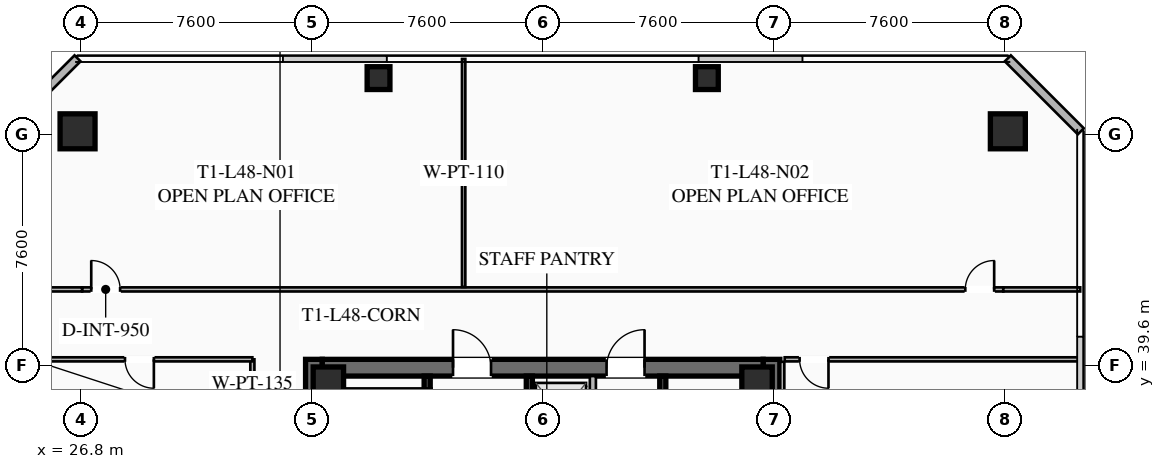
"""IFC4 building model, lengths in metres.
Left out: names, types, materials, properties, quantities, classifications, styles, units other than length and angle.
Written with IfcOpenShell. Run it as: python <this file> out.ifc"""

import sys

from ifc_helpers import new_model, si_unit, direction, frame, frame_2d, origin, origin_2d, place, context, subcontext, project, spatial, rectangle, hollow_rectangle, extrude, element, fill, save


model = new_model("IFC4")
c1 = context("Model", 3, precision=1e-05, world=origin(), true_north=direction((0.0, 1.0)))
c2 = subcontext(c1, "Body", "Model", "MODEL_VIEW")
j1 = project(units=[si_unit("LENGTHUNIT", "METRE"), si_unit("PLANEANGLEUNIT", "RADIAN")], contexts=[c1])
p1 = place(None, origin())
s1 = spatial("IfcSite", under=j1, at=p1, CompositionType="ELEMENT")
p2 = place(p1, origin())
s2 = spatial("IfcBuilding", under=s1, at=p2, CompositionType="ELEMENT")
p3 = place(p2, frame((0.0, 0.0, 178.3)))
s3 = spatial("IfcBuildingStorey", under=s2, at=p3, CompositionType="ELEMENT", Elevation=178.3)
for number, where, z_axis, x_axis in (
    (1, (34.475, 24.2, 0.0), (0.0, 0.0, 1.0), (0.0, 1.0, 0.0)),
    (2, (49.525, 39.8, 0.0), (0.0, 0.0, 1.0), (0.0, -1.0, 0.0)),
):
    element("IfcWall", number, at=place(p3, frame(where, z_axis=z_axis, x_axis=x_axis)), inside=s3, PredefinedType="SHEAR", context=c2, shape_type="SweptSolid", body=[
        extrude(rectangle(XDim=15.6, YDim=0.55, at=frame_2d((7.8, 0.0))), origin(), (0.0, 0.0, 1.0), 3.55),
    ])
p4 = place(p3, frame((34.75, 39.525, 0.0), z_axis=(0.0, 0.0, 1.0), x_axis=(1.0, 0.0, 0.0)))
e3 = element("IfcWall", 3, at=p4, inside=s3, PredefinedType="SHEAR", context=c2, shape_type="SweptSolid", body=[
    extrude(rectangle(XDim=14.5, YDim=0.55, at=frame_2d((7.25, 0.0))), origin(), (0.0, 0.0, 1.0), 3.55),
])
p5 = place(p4, frame((4.3, 0.0, 0.0)))
e4 = element("IfcOpeningElement", 4, at=p5, cuts=e3, PredefinedType="OPENING", context=c2, shape_type="SweptSolid", body=[
    extrude(rectangle(XDim=1.25, YDim=2.25, at=frame_2d((0.625, 1.125))), frame((0.0, 0.285, 0.0), z_axis=(0.0, -1.0, 0.0), x_axis=(1.0, 0.0, 0.0)), (0.0, 0.0, 1.0), 0.57),
])
p6 = place(p4, frame((9.35, 0.0, 0.0)))
e5 = element("IfcOpeningElement", 5, at=p6, cuts=e3, PredefinedType="OPENING", context=c2, shape_type="SweptSolid", body=[
    extrude(rectangle(XDim=1.25, YDim=2.25, at=frame_2d((0.625, 1.125))), frame((0.0, 0.285, 0.0), z_axis=(0.0, -1.0, 0.0), x_axis=(1.0, 0.0, 0.0)), (0.0, 0.0, 1.0), 0.57),
])
for number, where, z_axis, x_axis in (
    (6, (49.05, 39.05, 0.0), (0.0, 0.0, 1.0), (1.0, 0.0, 0.0)),
    (7, (34.95, 39.05, 0.0), (0.0, 0.0, 1.0), (1.0, 0.0, 0.0)),
):
    element("IfcColumn", number, at=place(p3, frame(where, z_axis=z_axis, x_axis=x_axis)), inside=s3, PredefinedType="COLUMN", context=c2, shape_type="SweptSolid", body=[
        extrude(hollow_rectangle(XDim=1.0, YDim=1.0, WallThickness=0.04, at=origin_2d()), origin(), (0.0, 0.0, 1.0), 3.37),
    ])
for number, where, z_axis, x_axis in (
    (8, (57.3, 47.3, 0.0), (0.0, 0.0, 1.0), (1.0, 0.0, 0.0)),
    (9, (26.7, 47.3, 0.0), (0.0, 0.0, 1.0), (1.0, 0.0, 0.0)),
):
    element("IfcColumn", number, at=place(p3, frame(where, z_axis=z_axis, x_axis=x_axis)), inside=s3, PredefinedType="COLUMN", context=c2, shape_type="SweptSolid", body=[
        extrude(hollow_rectangle(XDim=1.15, YDim=1.15, WallThickness=0.045, at=origin_2d()), origin(), (0.0, 0.0, 1.0), 3.37),
    ])
for number, where, z_axis, x_axis in (
    (10, (47.4, 49.05, 0.0), (0.0, 0.0, 1.0), (1.0, 0.0, 0.0)),
    (11, (36.6, 49.05, 0.0), (0.0, 0.0, 1.0), (1.0, 0.0, 0.0)),
):
    element("IfcColumn", number, at=place(p3, frame(where, z_axis=z_axis, x_axis=x_axis)), inside=s3, PredefinedType="COLUMN", context=c2, shape_type="SweptSolid", body=[
        extrude(hollow_rectangle(XDim=0.75, YDim=0.75, WallThickness=0.032, at=origin_2d()), origin(), (0.0, 0.0, 1.0), 3.37),
    ])
for number, where, z_axis, x_axis in (
    (12, (24.3, 47.3, 0.0), (0.0, 0.0, 1.0), (0.707, 0.707, 0.0)),
    (13, (57.3, 49.7, 0.0), (0.0, 0.0, 1.0), (0.707, -0.707, 0.0)),
):
    element("IfcWall", number, at=place(p3, frame(where, z_axis=z_axis, x_axis=x_axis)), inside=s3, PredefinedType="SOLIDWALL", context=c2, shape_type="SweptSolid", body=[
        extrude(rectangle(XDim=3.394, YDim=0.28, at=frame_2d((1.697, 0.0))), origin(), (0.0, 0.0, 1.0), 3.37),
    ])
p7 = place(p3, frame((38.2, 31.2, 0.0), z_axis=(0.0, 0.0, 1.0), x_axis=(0.0, 1.0, 0.0)))
e14 = element("IfcWall", 14, at=p7, inside=s3, PredefinedType="SHEAR", context=c2, shape_type="SweptSolid", body=[
    extrude(rectangle(XDim=8.05, YDim=0.2, at=frame_2d((4.025, 0.0))), origin(), (0.0, 0.0, 1.0), 3.37),
])
p8 = place(p7, frame((0.45, 0.0, 0.0)))
e15 = element("IfcOpeningElement", 15, at=p8, cuts=e14, PredefinedType="OPENING", context=c2, shape_type="SweptSolid", body=[
    extrude(rectangle(XDim=1.15, YDim=2.2, at=frame_2d((0.575, 1.1))), frame((0.0, 0.11, 0.0), z_axis=(0.0, -1.0, 0.0), x_axis=(1.0, 0.0, 0.0)), (0.0, 0.0, 1.0), 0.22),
])
p9 = place(p3, frame((41.56, 24.75, 0.0), z_axis=(0.0, 0.0, 1.0), x_axis=(0.0, 1.0, 0.0)))
e16 = element("IfcWall", 16, at=p9, inside=s3, PredefinedType="SHEAR", context=c2, shape_type="SweptSolid", body=[
    extrude(rectangle(XDim=14.5, YDim=0.2, at=frame_2d((7.25, 0.0))), origin(), (0.0, 0.0, 1.0), 3.37),
])
p10 = place(p3, frame((45.95, 39.25, 0.0), z_axis=(0.0, 0.0, 1.0), x_axis=(0.0, -1.0, 0.0)))
e17 = element("IfcWall", 17, at=p10, inside=s3, PredefinedType="SHEAR", context=c2, shape_type="SweptSolid", body=[
    extrude(rectangle(XDim=6.45, YDim=0.2, at=frame_2d((3.225, 0.0))), origin(), (0.0, 0.0, 1.0), 3.37),
])
p11 = place(p3, frame((43.65, 32.35, 0.0), z_axis=(0.0, 0.0, 1.0), x_axis=(0.0, 1.0, 0.0)))
e18 = element("IfcWall", 18, at=p11, inside=s3, PredefinedType="SOLIDWALL", context=c2, shape_type="SweptSolid", body=[
    extrude(rectangle(XDim=6.9, YDim=0.2, at=frame_2d((3.45, 0.0))), origin(), (0.0, 0.0, 1.0), 3.37),
])
p12 = place(p11, frame((0.575, 0.0, 0.0)))
e19 = element("IfcOpeningElement", 19, at=p12, cuts=e18, PredefinedType="OPENING", context=c2, shape_type="SweptSolid", body=[
    extrude(rectangle(XDim=1.1, YDim=2.2, at=frame_2d((0.55, 1.1))), frame((0.0, 0.11, 0.0), z_axis=(0.0, -1.0, 0.0), x_axis=(1.0, 0.0, 0.0)), (0.0, 0.0, 1.0), 0.22),
])
p13 = place(p11, frame((2.825, 0.0, 0.0)))
e20 = element("IfcOpeningElement", 20, at=p13, cuts=e18, PredefinedType="OPENING", context=c2, shape_type="SweptSolid", body=[
    extrude(rectangle(XDim=1.1, YDim=2.2, at=frame_2d((0.55, 1.1))), frame((0.0, 0.11, 0.0), z_axis=(0.0, -1.0, 0.0), x_axis=(1.0, 0.0, 0.0)), (0.0, 0.0, 1.0), 0.22),
])
p14 = place(p11, frame((5.075, 0.0, 0.0)))
e21 = element("IfcOpeningElement", 21, at=p14, cuts=e18, PredefinedType="OPENING", context=c2, shape_type="SweptSolid", body=[
    extrude(rectangle(XDim=1.1, YDim=2.2, at=frame_2d((0.55, 1.1))), frame((0.0, 0.11, 0.0), z_axis=(0.0, -1.0, 0.0), x_axis=(1.0, 0.0, 0.0)), (0.0, 0.0, 1.0), 0.22),
])
p15 = place(p3, frame((32.45, 35.4, 0.0), z_axis=(0.0, 0.0, 1.0), x_axis=(0.0, 1.0, 0.0)))
e22 = element("IfcWall", 22, at=p15, inside=s3, PredefinedType="PARTITIONING", context=c2, shape_type="SweptSolid", body=[
    extrude(rectangle(XDim=4.4, YDim=0.135, at=frame_2d((2.2, 0.0))), origin(), (0.0, 0.0, 1.0), 2.723),
])
p16 = place(p3, frame((26.85, 42.1, 0.0), z_axis=(0.0, 0.0, 1.0), x_axis=(1.0, 0.0, 0.0)))
e23 = element("IfcWall", 23, at=p16, inside=s3, PredefinedType="PARTITIONING", context=c2, shape_type="SweptSolid", body=[
    extrude(rectangle(XDim=30.3, YDim=0.135, at=frame_2d((15.15, 0.0))), origin(), (0.0, 0.0, 1.0), 2.723),
])
p17 = place(p16, frame((0.3, 0.0, 0.0)))
e24 = element("IfcOpeningElement", 24, at=p17, cuts=e23, PredefinedType="OPENING", context=c2, shape_type="SweptSolid", body=[
    extrude(rectangle(XDim=0.95, YDim=2.05, at=frame_2d((0.475, 1.025))), frame((0.0, 0.077, 0.0), z_axis=(0.0, -1.0, 0.0), x_axis=(1.0, 0.0, 0.0)), (0.0, 0.0, 1.0), 0.155),
])
p18 = place(p16, frame((29.05, 0.0, 0.0)))
e25 = element("IfcOpeningElement", 25, at=p18, cuts=e23, PredefinedType="OPENING", context=c2, shape_type="SweptSolid", body=[
    extrude(rectangle(XDim=0.95, YDim=2.05, at=frame_2d((0.475, 1.025))), frame((0.0, 0.077, 0.0), z_axis=(0.0, -1.0, 0.0), x_axis=(1.0, 0.0, 0.0)), (0.0, 0.0, 1.0), 0.155),
])
for number, where, z_axis, x_axis in (
    (26, (24.32, 42.1, 0.0), (0.0, 0.0, 1.0), (1.0, 0.0, 0.0)),
    (27, (57.15, 42.1, 0.0), (0.0, 0.0, 1.0), (1.0, 0.0, 0.0)),
):
    element("IfcWall", number, at=place(p3, frame(where, z_axis=z_axis, x_axis=x_axis)), inside=s3, PredefinedType="PARTITIONING", context=c2, shape_type="SweptSolid", body=[
        extrude(rectangle(XDim=2.53, YDim=0.135, at=frame_2d((1.265, 0.0))), origin(), (0.0, 0.0, 1.0), 2.723),
    ])
p19 = place(p3, frame((39.4, 42.18, 0.0), z_axis=(0.0, 0.0, 1.0), x_axis=(0.0, 1.0, 0.0)))
e28 = element("IfcWall", 28, at=p19, inside=s3, PredefinedType="PARTITIONING", context=c2, shape_type="SweptSolid", body=[
    extrude(rectangle(XDim=7.5, YDim=0.11, at=frame_2d((3.75, 0.0))), origin(), (0.0, 0.0, 1.0), 2.723),
])
p20 = place(p3, frame((49.88, 39.72, 0.0), z_axis=(0.0, 0.0, 1.0), x_axis=(0.0, -1.0, 0.0)))
e29 = element("IfcWall", 29, at=p20, inside=s3, PredefinedType="PARTITIONING", context=c2, shape_type="SweptSolid", body=[
    extrude(rectangle(XDim=15.44, YDim=0.135, at=frame_2d((7.72, 0.0))), origin(), (0.0, 0.0, 1.0), 2.723),
])
p21 = place(p3, frame((59.68, 39.8, 0.0), z_axis=(0.0, 0.0, 1.0), x_axis=(-1.0, 0.0, 0.0)))
e30 = element("IfcWall", 30, at=p21, inside=s3, PredefinedType="PARTITIONING", context=c2, shape_type="SweptSolid", body=[
    extrude(rectangle(XDim=9.72, YDim=0.135, at=frame_2d((4.86, 0.0))), origin(), (0.0, 0.0, 1.0), 2.723),
])
p22 = place(p21, frame((8.28, 0.0, 0.0)))
e31 = element("IfcOpeningElement", 31, at=p22, cuts=e30, PredefinedType="OPENING", context=c2, shape_type="SweptSolid", body=[
    extrude(rectangle(XDim=0.95, YDim=2.05, at=frame_2d((0.475, 1.025))), frame((0.0, 0.077, 0.0), z_axis=(0.0, -1.0, 0.0), x_axis=(1.0, 0.0, 0.0)), (0.0, 0.0, 1.0), 0.155),
])
p23 = place(p3, frame((32.45, 39.8, 0.0), z_axis=(0.0, 0.0, 1.0), x_axis=(-1.0, 0.0, 0.0)))
e32 = element("IfcWall", 32, at=p23, inside=s3, PredefinedType="PARTITIONING", context=c2, shape_type="SweptSolid", body=[
    extrude(rectangle(XDim=8.13, YDim=0.135, at=frame_2d((4.065, 0.0))), origin(), (0.0, 0.0, 1.0), 2.723),
])
p24 = place(p23, frame((3.24, 0.0, 0.0)))
e33 = element("IfcOpeningElement", 33, at=p24, cuts=e32, PredefinedType="OPENING", context=c2, shape_type="SweptSolid", body=[
    extrude(rectangle(XDim=0.95, YDim=2.05, at=frame_2d((0.475, 1.025))), frame((0.0, 0.077, 0.0), z_axis=(0.0, -1.0, 0.0), x_axis=(1.0, 0.0, 0.0)), (0.0, 0.0, 1.0), 0.155),
])
p25 = place(p5, origin())
e34 = element("IfcDoor", 34, at=p25, inside=s3, OperationType="SINGLE_SWING_LEFT", PredefinedType="DOOR", context=c2, shape_type="SweptSolid", body=[
    extrude(rectangle(XDim=1.25, YDim=2.25, at=frame_2d((0.625, 1.125))), frame((0.0, 0.025, 0.0), z_axis=(0.0, -1.0, 0.0), x_axis=(1.0, 0.0, 0.0)), (0.0, 0.0, 1.0), 0.05),
])
fill(e4, e34)
p26 = place(p6, origin())
e35 = element("IfcDoor", 35, at=p26, inside=s3, OperationType="SINGLE_SWING_RIGHT", PredefinedType="DOOR", context=c2, shape_type="SweptSolid", body=[
    extrude(rectangle(XDim=1.25, YDim=2.25, at=frame_2d((0.625, 1.125))), frame((0.0, 0.025, 0.0), z_axis=(0.0, -1.0, 0.0), x_axis=(1.0, 0.0, 0.0)), (0.0, 0.0, 1.0), 0.05),
])
fill(e5, e35)
p27 = place(p17, origin())
e36 = element("IfcDoor", 36, at=p27, inside=s3, OperationType="SINGLE_SWING_LEFT", PredefinedType="DOOR", context=c2, shape_type="SweptSolid", body=[
    extrude(rectangle(XDim=0.95, YDim=2.05, at=frame_2d((0.475, 1.025))), frame((0.0, 0.025, 0.0), z_axis=(0.0, -1.0, 0.0), x_axis=(1.0, 0.0, 0.0)), (0.0, 0.0, 1.0), 0.05),
])
fill(e24, e36)
p28 = place(p18, origin())
e37 = element("IfcDoor", 37, at=p28, inside=s3, OperationType="SINGLE_SWING_RIGHT", PredefinedType="DOOR", context=c2, shape_type="SweptSolid", body=[
    extrude(rectangle(XDim=0.95, YDim=2.05, at=frame_2d((0.475, 1.025))), frame((0.0, 0.025, 0.0), z_axis=(0.0, -1.0, 0.0), x_axis=(1.0, 0.0, 0.0)), (0.0, 0.0, 1.0), 0.05),
])
fill(e25, e37)
p29 = place(p22, origin())
e38 = element("IfcDoor", 38, at=p29, inside=s3, OperationType="SINGLE_SWING_LEFT", PredefinedType="DOOR", context=c2, shape_type="SweptSolid", body=[
    extrude(rectangle(XDim=0.95, YDim=2.05, at=frame_2d((0.475, 1.025))), frame((0.0, 0.025, 0.0), z_axis=(0.0, -1.0, 0.0), x_axis=(1.0, 0.0, 0.0)), (0.0, 0.0, 1.0), 0.05),
])
fill(e31, e38)
p30 = place(p24, origin())
e39 = element("IfcDoor", 39, at=p30, inside=s3, OperationType="SINGLE_SWING_LEFT", PredefinedType="DOOR", context=c2, shape_type="SweptSolid", body=[
    extrude(rectangle(XDim=0.95, YDim=2.05, at=frame_2d((0.475, 1.025))), frame((0.0, 0.025, 0.0), z_axis=(0.0, -1.0, 0.0), x_axis=(1.0, 0.0, 0.0)), (0.0, 0.0, 1.0), 0.05),
])
fill(e33, e39)
save(model, sys.argv[1])
